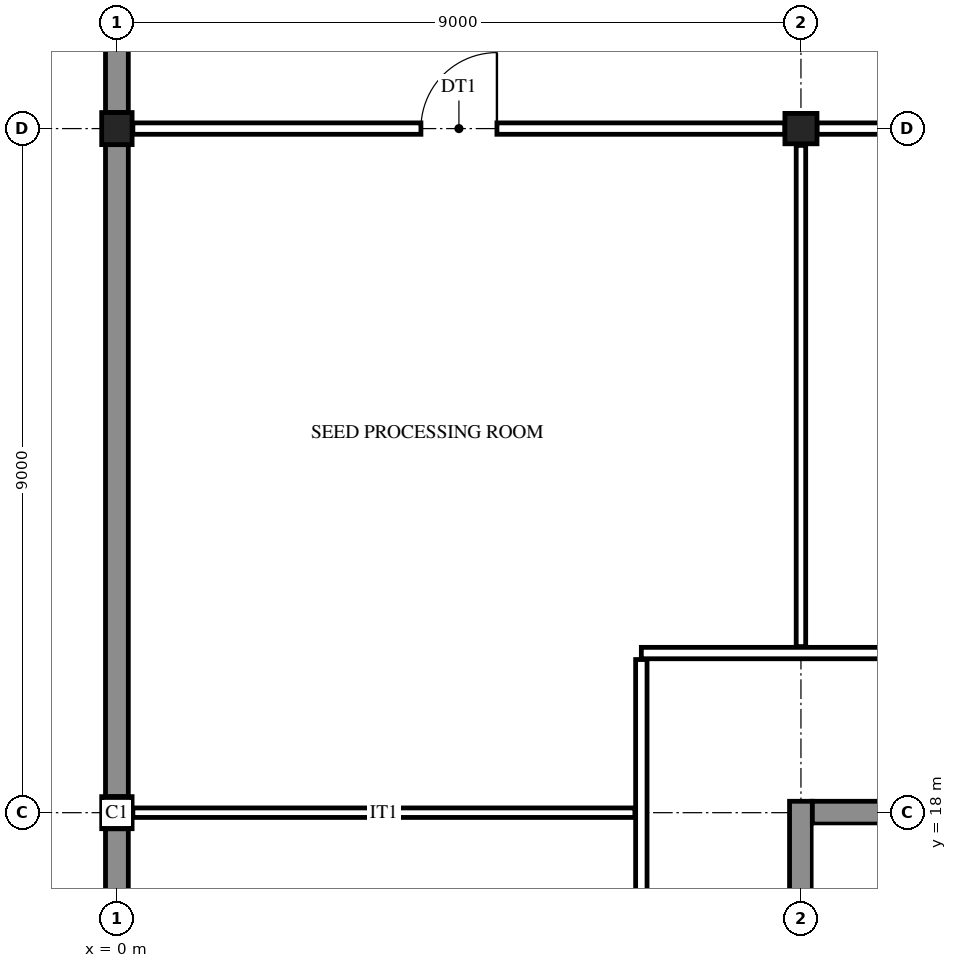
"""IFC4 building model, lengths in metres.
Left out: names, types, materials, properties, quantities, classifications, styles, units other than length and angle.
Written with IfcOpenShell. Run it as: python <this file> out.ifc"""

import sys

from ifc_helpers import new_model, si_unit, direction, frame, frame_2d, origin, origin_2d, place, context, subcontext, project, spatial, rectangle, i_section, extrude, element, fill, save


model = new_model("IFC4")
c1 = context("Model", 3, precision=1e-05, world=origin(), true_north=direction((0.0, 1.0)))
c2 = subcontext(c1, "Body", "Model", "MODEL_VIEW")
j1 = project(units=[si_unit("LENGTHUNIT", "METRE"), si_unit("PLANEANGLEUNIT", "RADIAN")], contexts=[c1])
p1 = place(None, origin())
s1 = spatial("IfcSite", under=j1, at=p1, CompositionType="ELEMENT")
p2 = place(p1, origin())
s2 = spatial("IfcBuilding", under=s1, at=p2, CompositionType="ELEMENT")
p3 = place(p2, frame((0.0, 0.0, -5.0)))
s3 = spatial("IfcBuildingStorey", under=s2, at=p3, CompositionType="ELEMENT", Elevation=-5.0)
for number, where, z_axis, x_axis in (
    (1, (0.0, 18.0, -0.4), (0.0, 0.0, 1.0), (1.0, 0.0, 0.0)),
    (2, (0.0, 27.0, -0.4), (0.0, 0.0, 1.0), (1.0, 0.0, 0.0)),
    (3, (9.0, 27.0, -0.4), (0.0, 0.0, 1.0), (0.0, 1.0, 0.0)),
):
    element("IfcColumn", number, at=place(p3, frame(where, z_axis=z_axis, x_axis=x_axis)), inside=s3, PredefinedType="COLUMN", context=c2, shape_type="SweptSolid", body=[
        extrude(i_section(OverallWidth=0.4, OverallDepth=0.422, WebThickness=0.028, FlangeThickness=0.036, at=origin_2d()), origin(), (0.0, 0.0, 1.0), 5.4),
    ])
p4 = place(p3, frame((9.0, 8.85, -0.4), z_axis=(0.0, 0.0, 1.0), x_axis=(0.0, 1.0, 0.0)))
e4 = element("IfcWall", 4, at=p4, inside=s3, PredefinedType="SHEAR", context=c2, shape_type="SweptSolid", body=[
    extrude(rectangle(XDim=9.3, YDim=0.3, at=frame_2d((4.65, 0.0))), origin(), (0.0, 0.0, 1.0), 5.4),
])
p5 = place(p3, frame((9.15, 18.0, -0.4), z_axis=(0.0, 0.0, 1.0), x_axis=(1.0, 0.0, 0.0)))
e5 = element("IfcWall", 5, at=p5, inside=s3, PredefinedType="SHEAR", context=c2, shape_type="SweptSolid", body=[
    extrude(rectangle(XDim=4.2, YDim=0.3, at=frame_2d((2.1, 0.0))), origin(), (0.0, 0.0, 1.0), 5.4),
])
p6 = place(p5, frame((1.5, 0.0, 0.4)))
e6 = element("IfcOpeningElement", 6, at=p6, cuts=e5, PredefinedType="OPENING", context=c2, shape_type="SweptSolid", body=[
    extrude(rectangle(XDim=1.2, YDim=2.1, at=frame_2d((0.6, 1.05))), frame((0.0, 0.16, 0.0), z_axis=(0.0, -1.0, 0.0), x_axis=(1.0, 0.0, 0.0)), (0.0, 0.0, 1.0), 0.32),
])
for number, where, z_axis, x_axis in (
    (7, (0.0, 9.211, 0.0), (0.0, 0.0, 1.0), (0.0, 1.0, 0.0)),
    (8, (0.0, 18.211, 0.0), (0.0, 0.0, 1.0), (0.0, 1.0, 0.0)),
):
    element("IfcWall", number, at=place(p3, frame(where, z_axis=z_axis, x_axis=x_axis)), inside=s3, PredefinedType="SOLIDWALL", context=c2, shape_type="SweptSolid", body=[
        extrude(rectangle(XDim=8.578, YDim=0.3, at=frame_2d((4.289, 0.0))), origin(), (0.0, 0.0, 1.0), 5.0),
    ])
p7 = place(p3, frame((0.0, 27.211, 0.0), z_axis=(0.0, 0.0, 1.0), x_axis=(0.0, 1.0, 0.0)))
e9 = element("IfcWall", 9, at=p7, inside=s3, PredefinedType="SOLIDWALL", context=c2, shape_type="SweptSolid", body=[
    extrude(rectangle(XDim=8.539, YDim=0.3, at=frame_2d((4.27, 0.0))), origin(), (0.0, 0.0, 1.0), 5.0),
])
p8 = place(p3, frame((6.9, 9.0, 0.0), z_axis=(0.0, 0.0, 1.0), x_axis=(0.0, 1.0, 0.0)))
e10 = element("IfcWall", 10, at=p8, inside=s3, PredefinedType="PARTITIONING", context=c2, shape_type="SweptSolid", body=[
    extrude(rectangle(XDim=11.015, YDim=0.15, at=frame_2d((5.507, 0.0))), origin(), (0.0, 0.0, 1.0), 4.267),
])
p9 = place(p8, frame((4.0, 0.0, 0.0)))
e11 = element("IfcOpeningElement", 11, at=p9, cuts=e10, PredefinedType="OPENING", context=c2, shape_type="SweptSolid", body=[
    extrude(rectangle(XDim=1.0, YDim=2.1, at=frame_2d((0.5, 1.05))), frame((0.0, 0.085, 0.0), z_axis=(0.0, -1.0, 0.0), x_axis=(1.0, 0.0, 0.0)), (0.0, 0.0, 1.0), 0.17),
])
p10 = place(p3, frame((9.0, 20.185, 0.0), z_axis=(0.0, 0.0, 1.0), x_axis=(0.0, 1.0, 0.0)))
e12 = element("IfcWall", 12, at=p10, inside=s3, PredefinedType="PARTITIONING", context=c2, shape_type="SweptSolid", body=[
    extrude(rectangle(XDim=6.594, YDim=0.125, at=frame_2d((3.297, 0.0))), origin(), (0.0, 0.0, 1.0), 4.267),
])
p11 = place(p3, frame((0.21, 18.0, 0.0), z_axis=(0.0, 0.0, 1.0), x_axis=(1.0, 0.0, 0.0)))
e13 = element("IfcWall", 13, at=p11, inside=s3, PredefinedType="PARTITIONING", context=c2, shape_type="SweptSolid", body=[
    extrude(rectangle(XDim=6.605, YDim=0.125, at=frame_2d((3.302, 0.0))), origin(), (0.0, 0.0, 1.0), 4.267),
])
p12 = place(p3, frame((6.9, 20.1, 0.0), z_axis=(0.0, 0.0, 1.0), x_axis=(1.0, 0.0, 0.0)))
e14 = element("IfcWall", 14, at=p12, inside=s3, PredefinedType="PARTITIONING", context=c2, shape_type="SweptSolid", body=[
    extrude(rectangle(XDim=20.1, YDim=0.15, at=frame_2d((10.05, 0.0))), origin(), (0.0, 0.0, 1.0), 4.267),
])
p13 = place(p12, frame((6.05, 0.0, 0.0)))
e15 = element("IfcOpeningElement", 15, at=p13, cuts=e14, PredefinedType="OPENING", context=c2, shape_type="SweptSolid", body=[
    extrude(rectangle(XDim=1.1, YDim=2.1, at=frame_2d((0.55, 1.05))), frame((0.0, 0.085, 0.0), z_axis=(0.0, -1.0, 0.0), x_axis=(1.0, 0.0, 0.0)), (0.0, 0.0, 1.0), 0.17),
])
p14 = place(p3, frame((0.21, 27.0, 0.0), z_axis=(0.0, 0.0, 1.0), x_axis=(1.0, 0.0, 0.0)))
e16 = element("IfcWall", 16, at=p14, inside=s3, PredefinedType="PARTITIONING", context=c2, shape_type="SweptSolid", body=[
    extrude(rectangle(XDim=8.58, YDim=0.15, at=frame_2d((4.29, 0.0))), origin(), (0.0, 0.0, 1.0), 4.272),
])
p15 = place(p14, frame((3.79, 0.0, 0.0)))
e17 = element("IfcOpeningElement", 17, at=p15, cuts=e16, PredefinedType="OPENING", context=c2, shape_type="SweptSolid", body=[
    extrude(rectangle(XDim=1.0, YDim=2.1, at=frame_2d((0.5, 1.05))), frame((0.0, 0.085, 0.0), z_axis=(0.0, -1.0, 0.0), x_axis=(1.0, 0.0, 0.0)), (0.0, 0.0, 1.0), 0.17),
])
p16 = place(p3, frame((9.21, 27.0, 0.0), z_axis=(0.0, 0.0, 1.0), x_axis=(1.0, 0.0, 0.0)))
e18 = element("IfcWall", 18, at=p16, inside=s3, PredefinedType="PARTITIONING", context=c2, shape_type="SweptSolid", body=[
    extrude(rectangle(XDim=8.58, YDim=0.15, at=frame_2d((4.29, 0.0))), origin(), (0.0, 0.0, 1.0), 4.272),
])
p17 = place(p15, frame((1.0, 0.0, 0.0), z_axis=(0.0, 0.0, 1.0), x_axis=(-1.0, 0.0, 0.0)))
e19 = element("IfcDoor", 19, at=p17, inside=s3, OperationType="SINGLE_SWING_RIGHT", PredefinedType="DOOR", context=c2, shape_type="SweptSolid", body=[
    extrude(rectangle(XDim=1.0, YDim=2.1, at=frame_2d((0.5, 1.05))), frame((0.0, 0.025, 0.0), z_axis=(0.0, -1.0, 0.0), x_axis=(1.0, 0.0, 0.0)), (0.0, 0.0, 1.0), 0.05),
])
fill(e17, e19)
save(model, sys.argv[1])
